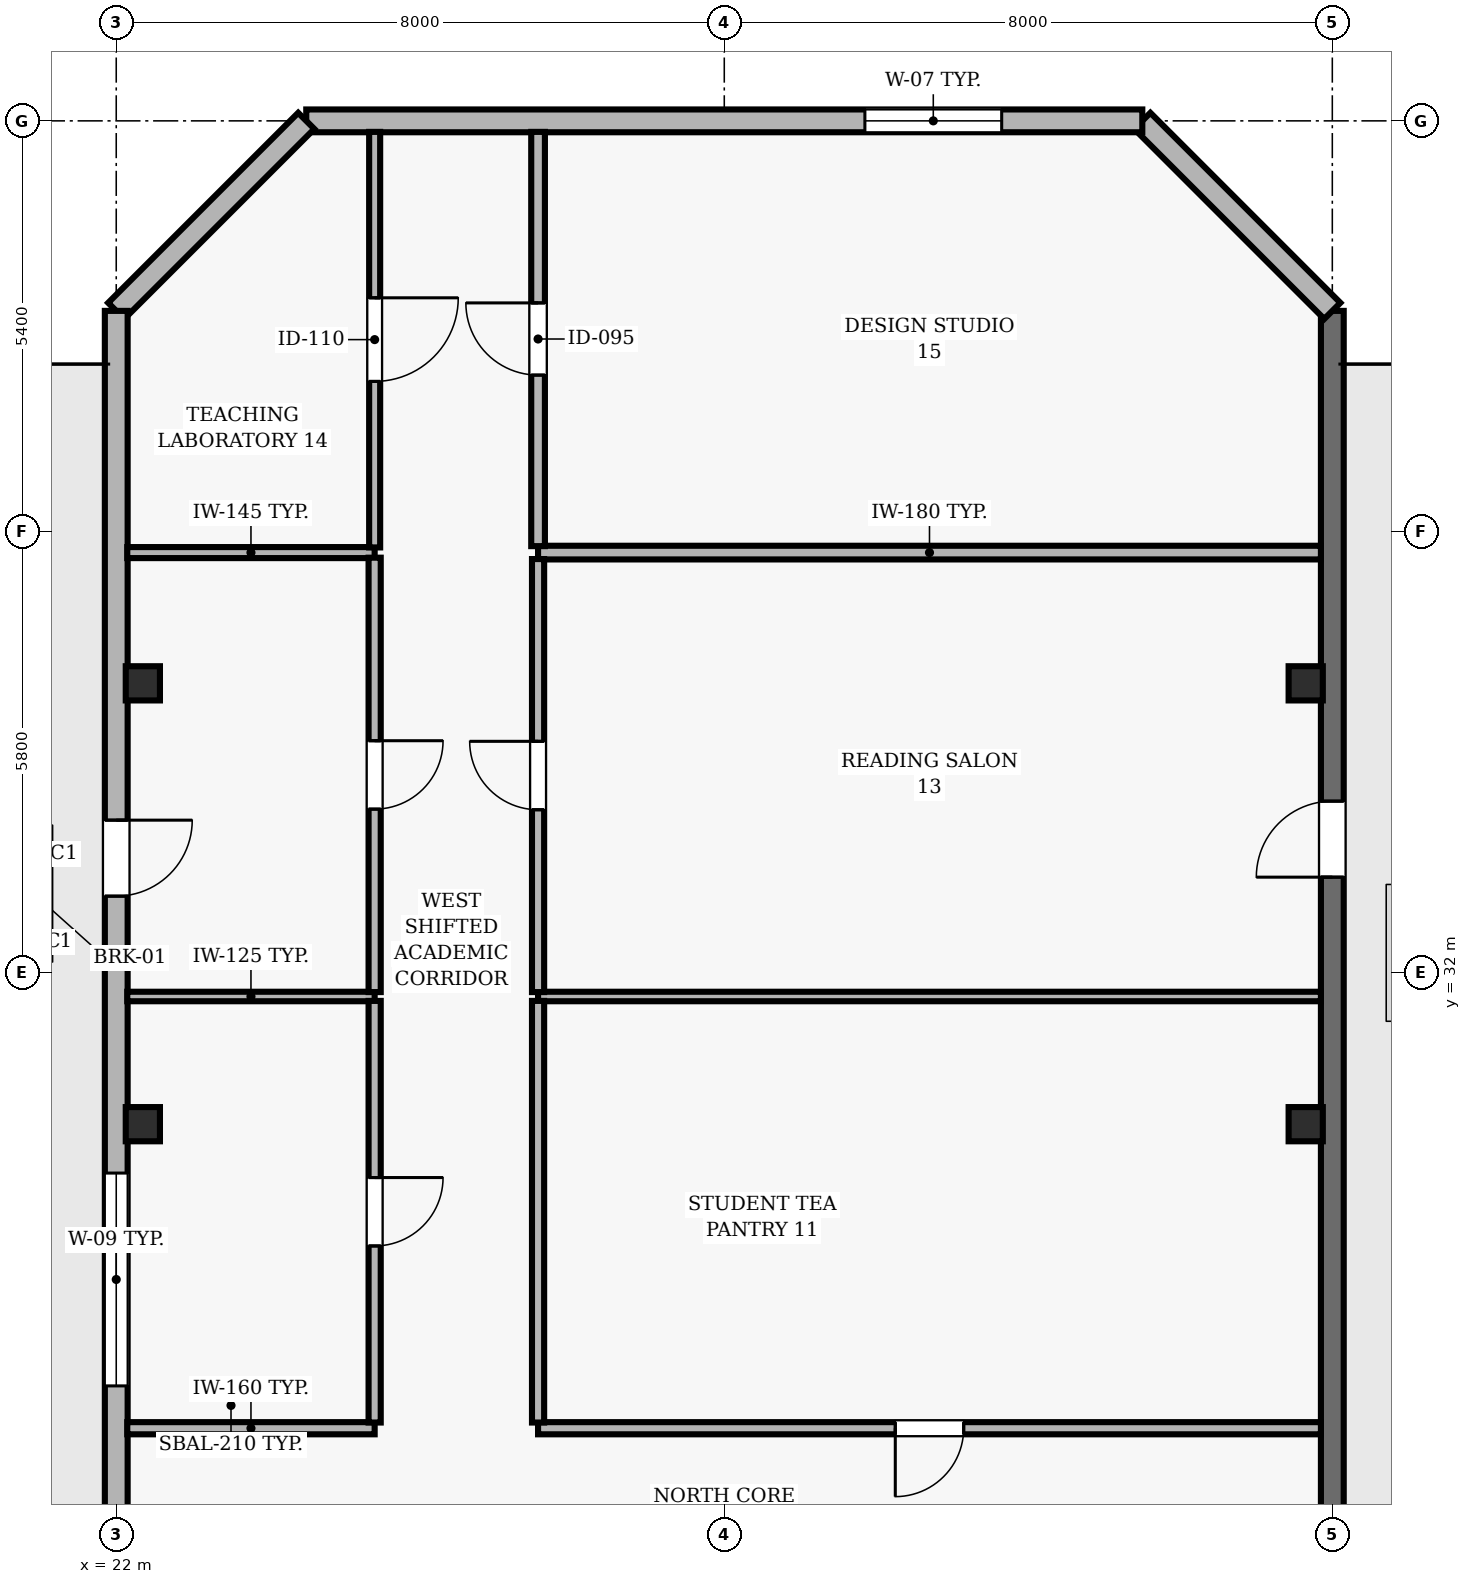
"""IFC4 building model, lengths in metres.
Left out: names, types, materials, properties, quantities, classifications, styles, units other than length and angle.
Written with IfcOpenShell. Run it as: python <this file> out.ifc"""

import sys

from ifc_helpers import new_model, si_unit, direction, frame, frame_2d, origin, origin_2d, place, context, subcontext, project, spatial, rectangle, hollow_rectangle, extrude, element, fill, save


model = new_model("IFC4")
c1 = context("Model", 3, precision=1e-05, world=origin(), true_north=direction((0.0, 1.0)))
c2 = subcontext(c1, "Body", "Model", "MODEL_VIEW")
j1 = project(units=[si_unit("LENGTHUNIT", "METRE"), si_unit("PLANEANGLEUNIT", "RADIAN")], contexts=[c1])
p1 = place(None, origin())
s1 = spatial("IfcSite", under=j1, at=p1, CompositionType="ELEMENT")
p2 = place(p1, origin())
s2 = spatial("IfcBuilding", under=s1, at=p2, CompositionType="ELEMENT")
p3 = place(p2, frame((0.0, 0.0, 230.4)))
s3 = spatial("IfcBuildingStorey", under=s2, at=p3, CompositionType="ELEMENT", Elevation=230.4)
for number, where, z_axis, x_axis in (
    (1, (22.35, 30.0, 0.0), (0.0, 0.0, 1.0), (1.0, 0.0, 0.0)),
    (2, (37.65, 30.0, 0.0), (0.0, 0.0, 1.0), (1.0, 0.0, 0.0)),
    (3, (22.35, 35.8, 0.0), (0.0, 0.0, 1.0), (1.0, 0.0, 0.0)),
    (4, (37.65, 35.8, 0.0), (0.0, 0.0, 1.0), (1.0, 0.0, 0.0)),
):
    element("IfcColumn", number, at=place(p3, frame(where, z_axis=z_axis, x_axis=x_axis)), inside=s3, PredefinedType="COLUMN", context=c2, shape_type="SweptSolid", body=[
        extrude(hollow_rectangle(XDim=0.45, YDim=0.45, WallThickness=0.02, at=origin_2d()), origin(), (0.0, 0.0, 1.0), 3.9),
    ])
p4 = place(p3, frame((38.0, 22.2, 0.0), z_axis=(0.0, 0.0, 1.0), x_axis=(0.0, 1.0, 0.0)))
e5 = element("IfcWall", 5, at=p4, inside=s3, PredefinedType="SOLIDWALL", context=c2, shape_type="SweptSolid", body=[
    extrude(rectangle(XDim=18.5, YDim=0.3, at=frame_2d((9.25, 0.0))), origin(), (0.0, 0.0, 1.0), 3.69),
])
p5 = place(p4, frame((11.05, 0.0, 0.0)))
e6 = element("IfcOpeningElement", 6, at=p5, cuts=e5, PredefinedType="OPENING", context=c2, shape_type="SweptSolid", body=[
    extrude(rectangle(XDim=1.0, YDim=2.2, at=frame_2d((0.5, 1.1))), frame((0.0, 0.16, 0.0), z_axis=(0.0, -1.0, 0.0), x_axis=(1.0, 0.0, 0.0)), (0.0, 0.0, 1.0), 0.32),
])
p6 = place(p3, frame((38.0, 40.7, 0.0), z_axis=(0.0, 0.0, 1.0), x_axis=(-0.707106781187, 0.707106781187, 0.0)))
e7 = element("IfcWall", 7, at=p6, inside=s3, PredefinedType="SOLIDWALL", context=c2, shape_type="SweptSolid", body=[
    extrude(rectangle(XDim=3.536, YDim=0.3, at=frame_2d((1.768, 0.0))), origin(), (0.0, 0.0, 1.0), 3.69),
])
p7 = place(p3, frame((35.5, 43.2, 0.0), z_axis=(0.0, 0.0, 1.0), x_axis=(-1.0, 0.0, 0.0)))
e8 = element("IfcWall", 8, at=p7, inside=s3, PredefinedType="SOLIDWALL", context=c2, shape_type="SweptSolid", body=[
    extrude(rectangle(XDim=11.0, YDim=0.3, at=frame_2d((5.5, 0.0))), origin(), (0.0, 0.0, 1.0), 3.69),
])
p8 = place(p7, frame((1.85, 0.0, 0.9)))
e9 = element("IfcOpeningElement", 9, at=p8, cuts=e8, PredefinedType="OPENING", context=c2, shape_type="SweptSolid", body=[
    extrude(rectangle(XDim=1.8, YDim=1.8, at=frame_2d((0.9, 0.9))), frame((0.0, 0.16, 0.0), z_axis=(0.0, -1.0, 0.0), x_axis=(1.0, 0.0, 0.0)), (0.0, 0.0, 1.0), 0.32),
])
p9 = place(p3, frame((24.5, 43.2, 0.0), z_axis=(0.0, 0.0, 1.0), x_axis=(-0.707106781187, -0.707106781187, 0.0)))
e10 = element("IfcWall", 10, at=p9, inside=s3, PredefinedType="SOLIDWALL", context=c2, shape_type="SweptSolid", body=[
    extrude(rectangle(XDim=3.536, YDim=0.3, at=frame_2d((1.768, 0.0))), origin(), (0.0, 0.0, 1.0), 3.69),
])
p10 = place(p3, frame((22.0, 40.7, 0.0), z_axis=(0.0, 0.0, 1.0), x_axis=(0.0, -1.0, 0.0)))
e11 = element("IfcWall", 11, at=p10, inside=s3, PredefinedType="SOLIDWALL", context=c2, shape_type="SweptSolid", body=[
    extrude(rectangle(XDim=38.2, YDim=0.3, at=frame_2d((19.1, 0.0))), origin(), (0.0, 0.0, 1.0), 3.69),
])
p11 = place(p10, frame((6.7, 0.0, 0.0)))
e12 = element("IfcOpeningElement", 12, at=p11, cuts=e11, PredefinedType="OPENING", context=c2, shape_type="SweptSolid", body=[
    extrude(rectangle(XDim=1.0, YDim=2.2, at=frame_2d((0.5, 1.1))), frame((0.0, 0.16, 0.0), z_axis=(0.0, -1.0, 0.0), x_axis=(1.0, 0.0, 0.0)), (0.0, 0.0, 1.0), 0.32),
])
p12 = place(p10, frame((11.343, 0.0, 0.9)))
e13 = element("IfcOpeningElement", 13, at=p12, cuts=e11, PredefinedType="OPENING", context=c2, shape_type="SweptSolid", body=[
    extrude(rectangle(XDim=2.8, YDim=1.8, at=frame_2d((1.4, 0.9))), frame((0.0, 0.16, 0.0), z_axis=(0.0, -1.0, 0.0), x_axis=(1.0, 0.0, 0.0)), (0.0, 0.0, 1.0), 0.32),
])
p13 = place(p10, frame((18.15, 0.0, 0.9)))
e14 = element("IfcOpeningElement", 14, at=p13, cuts=e11, PredefinedType="OPENING", context=c2, shape_type="SweptSolid", body=[
    extrude(rectangle(XDim=2.8, YDim=1.8, at=frame_2d((1.4, 0.9))), frame((0.0, 0.16, 0.0), z_axis=(0.0, -1.0, 0.0), x_axis=(1.0, 0.0, 0.0)), (0.0, 0.0, 1.0), 0.32),
])
p14 = place(p10, frame((22.257, 0.0, 0.9)))
e15 = element("IfcOpeningElement", 15, at=p14, cuts=e11, PredefinedType="OPENING", context=c2, shape_type="SweptSolid", body=[
    extrude(rectangle(XDim=2.8, YDim=1.8, at=frame_2d((1.4, 0.9))), frame((0.0, 0.16, 0.0), z_axis=(0.0, -1.0, 0.0), x_axis=(1.0, 0.0, 0.0)), (0.0, 0.0, 1.0), 0.32),
])
p15 = place(p10, frame((28.614, 0.0, 0.9)))
e16 = element("IfcOpeningElement", 16, at=p15, cuts=e11, PredefinedType="OPENING", context=c2, shape_type="SweptSolid", body=[
    extrude(rectangle(XDim=2.8, YDim=1.8, at=frame_2d((1.4, 0.9))), frame((0.0, 0.16, 0.0), z_axis=(0.0, -1.0, 0.0), x_axis=(1.0, 0.0, 0.0)), (0.0, 0.0, 1.0), 0.32),
])
p16 = place(p3, frame((25.4, 26.0, 0.0), z_axis=(0.0, 0.0, 1.0), x_axis=(-1.0, 0.0, 0.0)))
e17 = element("IfcWall", 17, at=p16, inside=s3, PredefinedType="PARTITIONING", context=c2, shape_type="SweptSolid", body=[
    extrude(rectangle(XDim=3.255, YDim=0.16, at=frame_2d((1.627, 0.0))), origin(), (0.0, 0.0, 1.0), 3.69),
])
p17 = place(p3, frame((25.4, 31.68, 0.0), z_axis=(0.0, 0.0, 1.0), x_axis=(-1.0, 0.0, 0.0)))
e18 = element("IfcWall", 18, at=p17, inside=s3, PredefinedType="PARTITIONING", context=c2, shape_type="SweptSolid", body=[
    extrude(rectangle(XDim=3.255, YDim=0.125, at=frame_2d((1.627, 0.0))), origin(), (0.0, 0.0, 1.0), 3.69),
])
p18 = place(p3, frame((25.4, 37.52, 0.0), z_axis=(0.0, 0.0, 1.0), x_axis=(-1.0, 0.0, 0.0)))
e19 = element("IfcWall", 19, at=p18, inside=s3, PredefinedType="PARTITIONING", context=c2, shape_type="SweptSolid", body=[
    extrude(rectangle(XDim=3.255, YDim=0.145, at=frame_2d((1.627, 0.0))), origin(), (0.0, 0.0, 1.0), 3.69),
])
p19 = place(p3, frame((37.85, 26.0, 0.0), z_axis=(0.0, 0.0, 1.0), x_axis=(-1.0, 0.0, 0.0)))
e20 = element("IfcWall", 20, at=p19, inside=s3, PredefinedType="PARTITIONING", context=c2, shape_type="SweptSolid", body=[
    extrude(rectangle(XDim=10.3, YDim=0.16, at=frame_2d((5.15, 0.0))), origin(), (0.0, 0.0, 1.0), 3.69),
])
p20 = place(p19, frame((4.7, 0.0, 0.0)))
e21 = element("IfcOpeningElement", 21, at=p20, cuts=e20, PredefinedType="OPENING", context=c2, shape_type="SweptSolid", body=[
    extrude(rectangle(XDim=0.9, YDim=2.1, at=frame_2d((0.45, 1.05))), frame((0.0, 0.09, 0.0), z_axis=(0.0, -1.0, 0.0), x_axis=(1.0, 0.0, 0.0)), (0.0, 0.0, 1.0), 0.18),
])
p21 = place(p3, frame((37.85, 31.68, 0.0), z_axis=(0.0, 0.0, 1.0), x_axis=(-1.0, 0.0, 0.0)))
e22 = element("IfcWall", 22, at=p21, inside=s3, PredefinedType="PARTITIONING", context=c2, shape_type="SweptSolid", body=[
    extrude(rectangle(XDim=10.3, YDim=0.125, at=frame_2d((5.15, 0.0))), origin(), (0.0, 0.0, 1.0), 3.69),
])
p22 = place(p3, frame((37.85, 37.52, 0.0), z_axis=(0.0, 0.0, 1.0), x_axis=(-1.0, 0.0, 0.0)))
e23 = element("IfcWall", 23, at=p22, inside=s3, PredefinedType="PARTITIONING", context=c2, shape_type="SweptSolid", body=[
    extrude(rectangle(XDim=10.3, YDim=0.18, at=frame_2d((5.15, 0.0))), origin(), (0.0, 0.0, 1.0), 3.69),
])
p23 = place(p3, frame((25.4, 31.622, 0.0), z_axis=(0.0, 0.0, 1.0), x_axis=(0.0, -1.0, 0.0)))
e24 = element("IfcWall", 24, at=p23, inside=s3, PredefinedType="PARTITIONING", context=c2, shape_type="SweptSolid", body=[
    extrude(rectangle(XDim=5.547, YDim=0.16, at=frame_2d((2.773, 0.0))), origin(), (0.0, 0.0, 1.0), 3.69),
])
p24 = place(p23, frame((2.324, 0.0, 0.0)))
e25 = element("IfcOpeningElement", 25, at=p24, cuts=e24, PredefinedType="OPENING", context=c2, shape_type="SweptSolid", body=[
    extrude(rectangle(XDim=0.9, YDim=2.1, at=frame_2d((0.45, 1.05))), frame((0.0, 0.09, 0.0), z_axis=(0.0, -1.0, 0.0), x_axis=(1.0, 0.0, 0.0)), (0.0, 0.0, 1.0), 0.18),
])
p25 = place(p3, frame((25.4, 37.453, 0.0), z_axis=(0.0, 0.0, 1.0), x_axis=(0.0, -1.0, 0.0)))
e26 = element("IfcWall", 26, at=p25, inside=s3, PredefinedType="PARTITIONING", context=c2, shape_type="SweptSolid", body=[
    extrude(rectangle(XDim=5.715, YDim=0.16, at=frame_2d((2.857, 0.0))), origin(), (0.0, 0.0, 1.0), 3.69),
])
p26 = place(p25, frame((2.408, 0.0, 0.0)))
e27 = element("IfcOpeningElement", 27, at=p26, cuts=e26, PredefinedType="OPENING", context=c2, shape_type="SweptSolid", body=[
    extrude(rectangle(XDim=0.9, YDim=2.1, at=frame_2d((0.45, 1.05))), frame((0.0, 0.09, 0.0), z_axis=(0.0, -1.0, 0.0), x_axis=(1.0, 0.0, 0.0)), (0.0, 0.0, 1.0), 0.18),
])
p27 = place(p3, frame((25.4, 43.055, 0.0), z_axis=(0.0, 0.0, 1.0), x_axis=(0.0, -1.0, 0.0)))
e28 = element("IfcWall", 28, at=p27, inside=s3, PredefinedType="PARTITIONING", context=c2, shape_type="SweptSolid", body=[
    extrude(rectangle(XDim=5.467, YDim=0.145, at=frame_2d((2.733, 0.0))), origin(), (0.0, 0.0, 1.0), 3.69),
])
p28 = place(p27, frame((2.183, 0.0, 0.0)))
e29 = element("IfcOpeningElement", 29, at=p28, cuts=e28, PredefinedType="OPENING", context=c2, shape_type="SweptSolid", body=[
    extrude(rectangle(XDim=1.1, YDim=2.15, at=frame_2d((0.55, 1.075))), frame((0.0, 0.083, 0.0), z_axis=(0.0, -1.0, 0.0), x_axis=(1.0, 0.0, 0.0)), (0.0, 0.0, 1.0), 0.165),
])
p29 = place(p3, frame((27.55, 26.075, 0.0), z_axis=(0.0, 0.0, 1.0), x_axis=(0.0, 1.0, 0.0)))
e30 = element("IfcWall", 30, at=p29, inside=s3, PredefinedType="PARTITIONING", context=c2, shape_type="SweptSolid", body=[
    extrude(rectangle(XDim=5.547, YDim=0.16, at=frame_2d((2.773, 0.0))), origin(), (0.0, 0.0, 1.0), 3.69),
])
p30 = place(p3, frame((27.55, 31.738, 0.0), z_axis=(0.0, 0.0, 1.0), x_axis=(0.0, 1.0, 0.0)))
e31 = element("IfcWall", 31, at=p30, inside=s3, PredefinedType="PARTITIONING", context=c2, shape_type="SweptSolid", body=[
    extrude(rectangle(XDim=5.697, YDim=0.16, at=frame_2d((2.849, 0.0))), origin(), (0.0, 0.0, 1.0), 3.69),
])
p31 = place(p30, frame((2.399, 0.0, 0.0)))
e32 = element("IfcOpeningElement", 32, at=p31, cuts=e31, PredefinedType="OPENING", context=c2, shape_type="SweptSolid", body=[
    extrude(rectangle(XDim=0.9, YDim=2.1, at=frame_2d((0.45, 1.05))), frame((0.0, 0.09, 0.0), z_axis=(0.0, -1.0, 0.0), x_axis=(1.0, 0.0, 0.0)), (0.0, 0.0, 1.0), 0.18),
])
p32 = place(p3, frame((27.55, 37.605, 0.0), z_axis=(0.0, 0.0, 1.0), x_axis=(0.0, 1.0, 0.0)))
e33 = element("IfcWall", 33, at=p32, inside=s3, PredefinedType="PARTITIONING", context=c2, shape_type="SweptSolid", body=[
    extrude(rectangle(XDim=5.45, YDim=0.18, at=frame_2d((2.725, 0.0))), origin(), (0.0, 0.0, 1.0), 3.69),
])
p33 = place(p32, frame((2.25, 0.0, 0.0)))
e34 = element("IfcOpeningElement", 34, at=p33, cuts=e33, PredefinedType="OPENING", context=c2, shape_type="SweptSolid", body=[
    extrude(rectangle(XDim=0.95, YDim=2.1, at=frame_2d((0.475, 1.05))), frame((0.0, 0.1, 0.0), z_axis=(0.0, -1.0, 0.0), x_axis=(1.0, 0.0, 0.0)), (0.0, 0.0, 1.0), 0.2),
])
p34 = place(p5, origin())
e35 = element("IfcDoor", 35, at=p34, inside=s3, OperationType="SINGLE_SWING_LEFT", PredefinedType="DOOR", context=c2, shape_type="SweptSolid", body=[
    extrude(rectangle(XDim=1.0, YDim=2.2, at=frame_2d((0.5, 1.1))), frame((0.0, 0.025, 0.0), z_axis=(0.0, -1.0, 0.0), x_axis=(1.0, 0.0, 0.0)), (0.0, 0.0, 1.0), 0.05),
])
fill(e6, e35)
p35 = place(p8, origin())
e36 = element("IfcWindow", 36, at=p35, inside=s3, PartitioningType="SINGLE_PANEL", PredefinedType="WINDOW", context=c2, shape_type="SweptSolid", body=[
    extrude(rectangle(XDim=1.8, YDim=1.8, at=frame_2d((0.9, 0.9))), frame((0.0, 0.03, 0.0), z_axis=(0.0, -1.0, 0.0), x_axis=(1.0, 0.0, 0.0)), (0.0, 0.0, 1.0), 0.06),
])
fill(e9, e36)
p36 = place(p11, origin())
e37 = element("IfcDoor", 37, at=p36, inside=s3, OperationType="SINGLE_SWING_LEFT", PredefinedType="DOOR", context=c2, shape_type="SweptSolid", body=[
    extrude(rectangle(XDim=1.0, YDim=2.2, at=frame_2d((0.5, 1.1))), frame((0.0, 0.025, 0.0), z_axis=(0.0, -1.0, 0.0), x_axis=(1.0, 0.0, 0.0)), (0.0, 0.0, 1.0), 0.05),
])
fill(e12, e37)
p37 = place(p12, origin())
e38 = element("IfcWindow", 38, at=p37, inside=s3, PartitioningType="SINGLE_PANEL", PredefinedType="WINDOW", context=c2, shape_type="SweptSolid", body=[
    extrude(rectangle(XDim=2.8, YDim=1.8, at=frame_2d((1.4, 0.9))), frame((0.0, 0.03, 0.0), z_axis=(0.0, -1.0, 0.0), x_axis=(1.0, 0.0, 0.0)), (0.0, 0.0, 1.0), 0.06),
])
fill(e13, e38)
p38 = place(p24, origin())
e39 = element("IfcDoor", 39, at=p38, inside=s3, OperationType="SINGLE_SWING_LEFT", PredefinedType="DOOR", context=c2, shape_type="SweptSolid", body=[
    extrude(rectangle(XDim=0.9, YDim=2.1, at=frame_2d((0.45, 1.05))), frame((0.0, 0.025, 0.0), z_axis=(0.0, -1.0, 0.0), x_axis=(1.0, 0.0, 0.0)), (0.0, 0.0, 1.0), 0.05),
])
fill(e25, e39)
p39 = place(p20, origin())
e40 = element("IfcDoor", 40, at=p39, inside=s3, OperationType="SINGLE_SWING_RIGHT", PredefinedType="DOOR", context=c2, shape_type="SweptSolid", body=[
    extrude(rectangle(XDim=0.9, YDim=2.1, at=frame_2d((0.45, 1.05))), frame((0.0, 0.025, 0.0), z_axis=(0.0, -1.0, 0.0), x_axis=(1.0, 0.0, 0.0)), (0.0, 0.0, 1.0), 0.05),
])
fill(e21, e40)
p40 = place(p26, origin())
e41 = element("IfcDoor", 41, at=p40, inside=s3, OperationType="SINGLE_SWING_LEFT", PredefinedType="DOOR", context=c2, shape_type="SweptSolid", body=[
    extrude(rectangle(XDim=0.9, YDim=2.1, at=frame_2d((0.45, 1.05))), frame((0.0, 0.025, 0.0), z_axis=(0.0, -1.0, 0.0), x_axis=(1.0, 0.0, 0.0)), (0.0, 0.0, 1.0), 0.05),
])
fill(e27, e41)
p41 = place(p31, origin())
e42 = element("IfcDoor", 42, at=p41, inside=s3, OperationType="SINGLE_SWING_RIGHT", PredefinedType="DOOR", context=c2, shape_type="SweptSolid", body=[
    extrude(rectangle(XDim=0.9, YDim=2.1, at=frame_2d((0.45, 1.05))), frame((0.0, 0.025, 0.0), z_axis=(0.0, -1.0, 0.0), x_axis=(1.0, 0.0, 0.0)), (0.0, 0.0, 1.0), 0.05),
])
fill(e32, e42)
p42 = place(p28, origin())
e43 = element("IfcDoor", 43, at=p42, inside=s3, OperationType="SINGLE_SWING_LEFT", PredefinedType="DOOR", context=c2, shape_type="SweptSolid", body=[
    extrude(rectangle(XDim=1.1, YDim=2.15, at=frame_2d((0.55, 1.075))), frame((0.0, 0.025, 0.0), z_axis=(0.0, -1.0, 0.0), x_axis=(1.0, 0.0, 0.0)), (0.0, 0.0, 1.0), 0.05),
])
fill(e29, e43)
p43 = place(p33, origin())
e44 = element("IfcDoor", 44, at=p43, inside=s3, OperationType="SINGLE_SWING_RIGHT", PredefinedType="DOOR", context=c2, shape_type="SweptSolid", body=[
    extrude(rectangle(XDim=0.95, YDim=2.1, at=frame_2d((0.475, 1.05))), frame((0.0, 0.025, 0.0), z_axis=(0.0, -1.0, 0.0), x_axis=(1.0, 0.0, 0.0)), (0.0, 0.0, 1.0), 0.05),
])
fill(e34, e44)
save(model, sys.argv[1])
